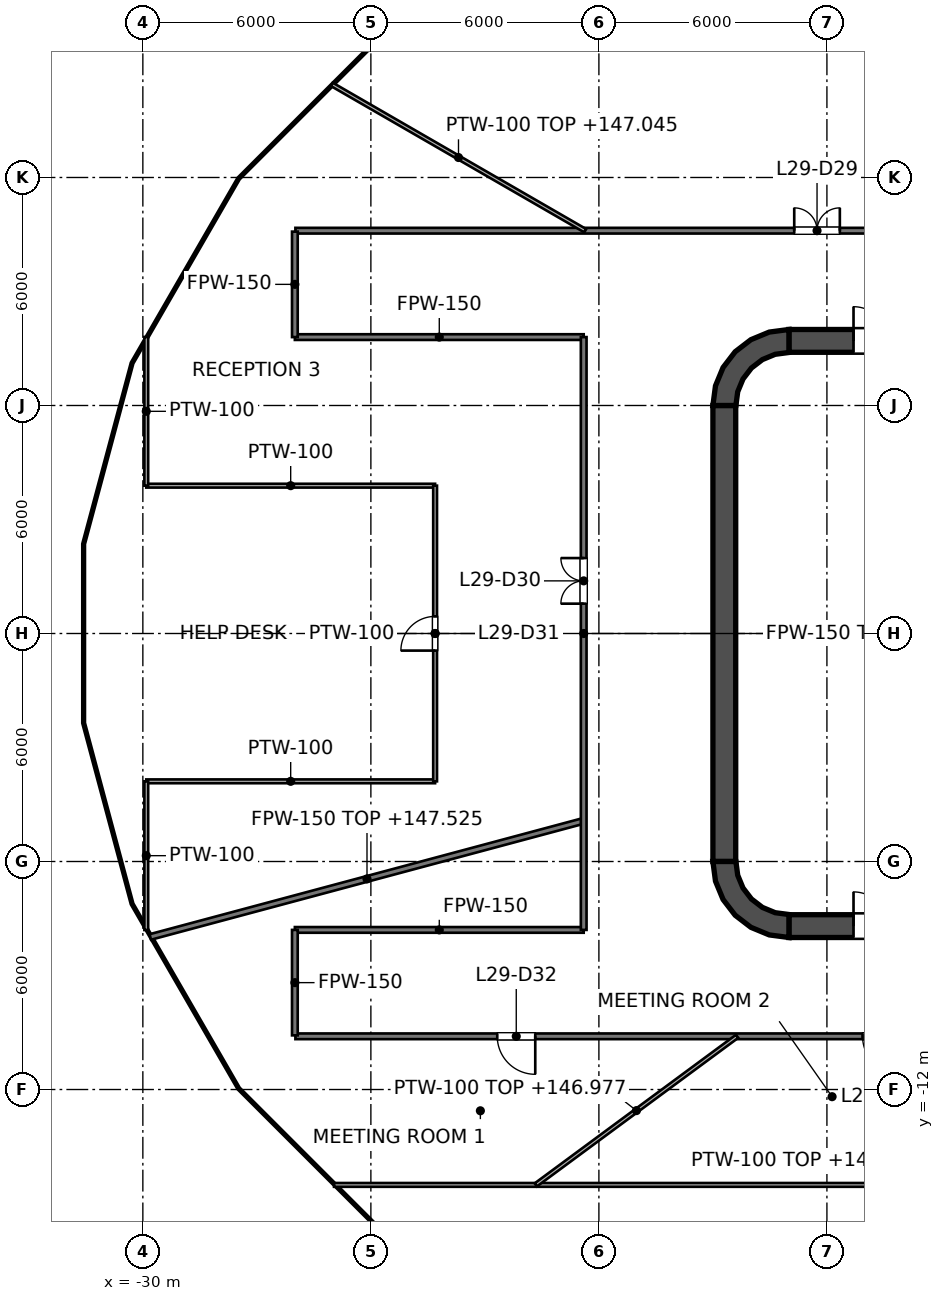
"""IFC4 building model, lengths in metres.
Left out: names, types, materials, properties, quantities, classifications, styles, units other than length and angle.
Written with IfcOpenShell. Run it as: python <this file> out.ifc"""

import sys

from ifc_helpers import new_model, si_unit, direction, frame, frame_2d, origin, place, context, subcontext, project, spatial, polyline, rectangle, outline, extrude, element, fill, save


model = new_model("IFC4")
c1 = context("Model", 3, precision=1e-05, world=origin(), true_north=direction((0.0, 1.0)))
c2 = subcontext(c1, "Body", "Model", "MODEL_VIEW")
j1 = project(units=[si_unit("LENGTHUNIT", "METRE"), si_unit("PLANEANGLEUNIT", "RADIAN")], contexts=[c1])
p1 = place(None, origin())
s1 = spatial("IfcSite", under=j1, at=p1, CompositionType="ELEMENT")
p2 = place(p1, origin())
s2 = spatial("IfcBuilding", under=s1, at=p2, CompositionType="ELEMENT")
p3 = place(p2, frame((0.0, 0.0, 144.0)))
s3 = spatial("IfcBuildingStorey", under=s2, at=p3, CompositionType="ELEMENT", Elevation=144.0)
p4 = place(p3, frame((-13.0, 7.7, 0.0), z_axis=(0.0, 0.0, 1.0), x_axis=(1.0, 0.0, 0.0)))
e1 = element("IfcWall", 1, at=p4, inside=s3, PredefinedType="SHEAR", context=c2, shape_type="SweptSolid", body=[
    extrude(rectangle(XDim=26.0, YDim=0.6, at=frame_2d((13.0, 0.0))), origin(), (0.0, 0.0, 1.0), 4.2),
])
p5 = place(p4, frame((1.7, 0.0, 0.0)))
e2 = element("IfcOpeningElement", 2, at=p5, cuts=e1, PredefinedType="OPENING", context=c2, shape_type="SweptSolid", body=[
    extrude(rectangle(XDim=1.8, YDim=2.1, at=frame_2d((0.9, 1.05))), frame((0.0, 0.3, 0.0), z_axis=(0.0, -1.0, 0.0), x_axis=(1.0, 0.0, 0.0)), (0.0, 0.0, 1.0), 0.6),
])
p6 = place(p4, frame((22.5, 0.0, 0.0)))
e3 = element("IfcOpeningElement", 3, at=p6, cuts=e1, PredefinedType="OPENING", context=c2, shape_type="SweptSolid", body=[
    extrude(rectangle(XDim=1.8, YDim=2.1, at=frame_2d((0.9, 1.05))), frame((0.0, 0.3, 0.0), z_axis=(0.0, -1.0, 0.0), x_axis=(1.0, 0.0, 0.0)), (0.0, 0.0, 1.0), 0.6),
])
p7 = place(p3, frame((-13.0, -7.7, 0.0), z_axis=(0.0, 0.0, 1.0), x_axis=(1.0, 0.0, 0.0)))
e4 = element("IfcWall", 4, at=p7, inside=s3, PredefinedType="SHEAR", context=c2, shape_type="SweptSolid", body=[
    extrude(rectangle(XDim=26.0, YDim=0.6, at=frame_2d((13.0, 0.0))), origin(), (0.0, 0.0, 1.0), 4.2),
])
p8 = place(p7, frame((1.7, 0.0, 0.0)))
e5 = element("IfcOpeningElement", 5, at=p8, cuts=e4, PredefinedType="OPENING", context=c2, shape_type="SweptSolid", body=[
    extrude(rectangle(XDim=1.8, YDim=2.1, at=frame_2d((0.9, 1.05))), frame((0.0, 0.3, 0.0), z_axis=(0.0, -1.0, 0.0), x_axis=(1.0, 0.0, 0.0)), (0.0, 0.0, 1.0), 0.6),
])
p9 = place(p7, frame((22.5, 0.0, 0.0)))
e6 = element("IfcOpeningElement", 6, at=p9, cuts=e4, PredefinedType="OPENING", context=c2, shape_type="SweptSolid", body=[
    extrude(rectangle(XDim=1.8, YDim=2.1, at=frame_2d((0.9, 1.05))), frame((0.0, 0.3, 0.0), z_axis=(0.0, -1.0, 0.0), x_axis=(1.0, 0.0, 0.0)), (0.0, 0.0, 1.0), 0.6),
])
p10 = place(p3, frame((-14.7, -6.0, 0.0), z_axis=(0.0, 0.0, 1.0), x_axis=(0.0, 1.0, 0.0)))
e7 = element("IfcWall", 7, at=p10, inside=s3, PredefinedType="SHEAR", context=c2, shape_type="SweptSolid", body=[
    extrude(rectangle(XDim=12.0, YDim=0.6, at=frame_2d((6.0, 0.0))), origin(), (0.0, 0.0, 1.0), 4.2),
])
p11 = place(p3, origin())
e8 = element("IfcWall", 8, at=p11, inside=s3, PredefinedType="SHEAR", context=c2, shape_type="SweptSolid", body=[
    extrude(outline(polyline([(-15.0, 6.0), (-14.395, 6.0), (-14.347, 6.361), (-14.208, 6.698), (-13.986, 6.986), (-13.698, 7.208), (-13.361, 7.347), (-13.0, 7.395), (-13.0, 8.0), (-13.518, 7.932), (-14.0, 7.732), (-14.414, 7.414), (-14.732, 7.0), (-14.932, 6.518), (-15.0, 6.0)])), origin(), (0.0, 0.0, 1.0), 4.2),
])
e9 = element("IfcWall", 9, at=p11, inside=s3, PredefinedType="SHEAR", context=c2, shape_type="SweptSolid", body=[
    extrude(outline(polyline([(-13.0, -8.0), (-13.0, -7.395), (-13.361, -7.347), (-13.698, -7.208), (-13.986, -6.986), (-14.208, -6.698), (-14.347, -6.361), (-14.395, -6.0), (-15.0, -6.0), (-14.932, -6.518), (-14.732, -7.0), (-14.414, -7.414), (-14.0, -7.732), (-13.518, -7.932), (-13.0, -8.0)])), origin(), (0.0, 0.0, 1.0), 4.2),
])
p12 = place(p3, frame((-11.8, -7.4, 0.0), z_axis=(0.0, 0.0, 1.0), x_axis=(0.0, 1.0, 0.0)))
e10 = element("IfcWall", 10, at=p12, inside=s3, PredefinedType="SOLIDWALL", context=c2, shape_type="SweptSolid", body=[
    extrude(rectangle(XDim=14.8, YDim=0.4, at=frame_2d((7.4, 0.0))), origin(), (0.0, 0.0, 1.0), 3.9),
])
p13 = place(p12, frame((11.2, 0.0, 0.0)))
e11 = element("IfcOpeningElement", 11, at=p13, cuts=e10, PredefinedType="OPENING", context=c2, shape_type="SweptSolid", body=[
    extrude(rectangle(XDim=1.1, YDim=2.1, at=frame_2d((0.55, 1.05))), frame((0.0, 0.2, 0.0), z_axis=(0.0, -1.0, 0.0), x_axis=(1.0, 0.0, 0.0)), (0.0, 0.0, 1.0), 0.4),
])
p14 = place(p12, frame((8.3, 0.0, 0.0)))
e12 = element("IfcOpeningElement", 12, at=p14, cuts=e10, PredefinedType="OPENING", context=c2, shape_type="SweptSolid", body=[
    extrude(rectangle(XDim=1.1, YDim=2.1, at=frame_2d((0.55, 1.05))), frame((0.0, 0.2, 0.0), z_axis=(0.0, -1.0, 0.0), x_axis=(1.0, 0.0, 0.0)), (0.0, 0.0, 1.0), 0.4),
])
p15 = place(p12, frame((5.4, 0.0, 0.0)))
e13 = element("IfcOpeningElement", 13, at=p15, cuts=e10, PredefinedType="OPENING", context=c2, shape_type="SweptSolid", body=[
    extrude(rectangle(XDim=1.1, YDim=2.1, at=frame_2d((0.55, 1.05))), frame((0.0, 0.2, 0.0), z_axis=(0.0, -1.0, 0.0), x_axis=(1.0, 0.0, 0.0)), (0.0, 0.0, 1.0), 0.4),
])
p16 = place(p12, frame((13.552, 0.0, 0.0)))
e14 = element("IfcOpeningElement", 14, at=p16, cuts=e10, PredefinedType="OPENING", context=c2, shape_type="SweptSolid", body=[
    extrude(rectangle(XDim=0.9, YDim=2.1, at=frame_2d((0.45, 1.05))), frame((0.0, 0.2, 0.0), z_axis=(0.0, -1.0, 0.0), x_axis=(1.0, 0.0, 0.0)), (0.0, 0.0, 1.0), 0.4),
])
p17 = place(p12, frame((0.347, 0.0, 0.0)))
e15 = element("IfcOpeningElement", 15, at=p17, cuts=e10, PredefinedType="OPENING", context=c2, shape_type="SweptSolid", body=[
    extrude(rectangle(XDim=0.9, YDim=2.1, at=frame_2d((0.45, 1.05))), frame((0.0, 0.2, 0.0), z_axis=(0.0, -1.0, 0.0), x_axis=(1.0, 0.0, 0.0)), (0.0, 0.0, 1.0), 0.4),
])
e16 = element("IfcWall", 16, at=p11, inside=s3, PredefinedType="SOLIDWALL", context=c2, shape_type="SweptSolid", body=[
    extrude(outline(polyline([(-12.0, -5.925), (-12.0, -5.675), (-14.15, -5.675), (-14.15, -3.025), (-12.0, -3.025), (-12.0, -2.775), (-14.15, -2.775), (-14.15, -0.125), (-12.0, -0.125), (-12.0, 0.125), (-14.15, 0.125), (-14.15, 2.775), (-12.0, 2.775), (-12.0, 3.025), (-14.15, 3.025), (-14.15, 5.675), (-12.0, 5.675), (-12.0, 5.925), (-14.15, 5.925), (-14.4, 5.925), (-14.4, 5.675), (-14.4, 3.025), (-14.4, 2.775), (-14.4, 0.125), (-14.4, -0.125), (-14.4, -2.775), (-14.4, -3.025), (-14.4, -5.675), (-14.4, -5.925), (-14.15, -5.925), (-12.0, -5.925)])), origin(), (0.0, 0.0, 1.0), 3.9),
])
p18 = place(p3, frame((-12.581, 21.79, 0.0), z_axis=(0.0, 0.0, 1.0), x_axis=(0.500038653944, -0.866003085769, 0.0)))
e17 = element("IfcWall", 17, at=p18, inside=s3, PredefinedType="PARTITIONING", context=c2, shape_type="SweptSolid", body=[
    extrude(rectangle(XDim=12.921, YDim=0.15, at=frame_2d((6.461, 0.0))), origin(), (0.0, 0.0, 1.0), 3.277),
])
p19 = place(p3, frame((-25.986, -10.6, 0.0), z_axis=(0.0, 0.0, 1.0), x_axis=(1.0, 0.0, 0.0)))
e18 = element("IfcWall", 18, at=p19, inside=s3, PredefinedType="PARTITIONING", context=c2, shape_type="SweptSolid", body=[
    extrude(rectangle(XDim=51.972, YDim=0.15, at=frame_2d((25.986, 0.0))), origin(), (0.0, 0.0, 1.0), 2.968),
])
p20 = place(p19, frame((47.628, 0.0, 0.0)))
e19 = element("IfcOpeningElement", 19, at=p20, cuts=e18, PredefinedType="OPENING", context=c2, shape_type="SweptSolid", body=[
    extrude(rectangle(XDim=1.0, YDim=2.1, at=frame_2d((0.5, 1.05))), frame((0.0, 0.075, 0.0), z_axis=(0.0, -1.0, 0.0), x_axis=(1.0, 0.0, 0.0)), (0.0, 0.0, 1.0), 0.15),
])
p21 = place(p19, frame((5.312, 0.0, 0.0)))
e20 = element("IfcOpeningElement", 20, at=p21, cuts=e18, PredefinedType="OPENING", context=c2, shape_type="SweptSolid", body=[
    extrude(rectangle(XDim=1.0, YDim=2.1, at=frame_2d((0.5, 1.05))), frame((0.0, 0.075, 0.0), z_axis=(0.0, -1.0, 0.0), x_axis=(1.0, 0.0, 0.0)), (0.0, 0.0, 1.0), 0.15),
])
p22 = place(p19, frame((14.924, 0.0, 0.0)))
e21 = element("IfcOpeningElement", 21, at=p22, cuts=e18, PredefinedType="OPENING", context=c2, shape_type="SweptSolid", body=[
    extrude(rectangle(XDim=1.0, YDim=2.1, at=frame_2d((0.5, 1.05))), frame((0.0, 0.075, 0.0), z_axis=(0.0, -1.0, 0.0), x_axis=(1.0, 0.0, 0.0)), (0.0, 0.0, 1.0), 0.15),
])
p23 = place(p19, frame((22.156, 0.0, 0.0)))
e22 = element("IfcOpeningElement", 22, at=p23, cuts=e18, PredefinedType="OPENING", context=c2, shape_type="SweptSolid", body=[
    extrude(rectangle(XDim=1.0, YDim=2.1, at=frame_2d((0.5, 1.05))), frame((0.0, 0.075, 0.0), z_axis=(0.0, -1.0, 0.0), x_axis=(1.0, 0.0, 0.0)), (0.0, 0.0, 1.0), 0.15),
])
p24 = place(p19, frame((27.795, 0.0, 0.0)))
e23 = element("IfcOpeningElement", 23, at=p24, cuts=e18, PredefinedType="OPENING", context=c2, shape_type="SweptSolid", body=[
    extrude(rectangle(XDim=1.0, YDim=2.1, at=frame_2d((0.5, 1.05))), frame((0.0, 0.075, 0.0), z_axis=(0.0, -1.0, 0.0), x_axis=(1.0, 0.0, 0.0)), (0.0, 0.0, 1.0), 0.15),
])
p25 = place(p19, frame((37.045, 0.0, 0.0)))
e24 = element("IfcOpeningElement", 24, at=p25, cuts=e18, PredefinedType="OPENING", context=c2, shape_type="SweptSolid", body=[
    extrude(rectangle(XDim=1.0, YDim=2.1, at=frame_2d((0.5, 1.05))), frame((0.0, 0.075, 0.0), z_axis=(0.0, -1.0, 0.0), x_axis=(1.0, 0.0, 0.0)), (0.0, 0.0, 1.0), 0.15),
])
for number, where, z_axis, x_axis in (
    (25, (-26.0, -7.8, 0.0), (0.0, 0.0, 1.0), (1.0, 0.0, 0.0)),
    (26, (-26.0, 7.8, 0.0), (0.0, 0.0, 1.0), (1.0, 0.0, 0.0)),
):
    element("IfcWall", number, at=place(p3, frame(where, z_axis=z_axis, x_axis=x_axis)), inside=s3, PredefinedType="PARTITIONING", context=c2, shape_type="SweptSolid", body=[
        extrude(rectangle(XDim=7.6, YDim=0.15, at=frame_2d((3.8, 0.0))), origin(), (0.0, 0.0, 1.0), 2.977),
    ])
p26 = place(p3, frame((-25.986, 10.6, 0.0), z_axis=(0.0, 0.0, 1.0), x_axis=(1.0, 0.0, 0.0)))
e27 = element("IfcWall", 27, at=p26, inside=s3, PredefinedType="PARTITIONING", context=c2, shape_type="SweptSolid", body=[
    extrude(rectangle(XDim=51.972, YDim=0.15, at=frame_2d((25.986, 0.0))), origin(), (0.0, 0.0, 1.0), 2.968),
])
p27 = place(p26, frame((42.031, 0.0, 0.0)))
e28 = element("IfcOpeningElement", 28, at=p27, cuts=e27, PredefinedType="OPENING", context=c2, shape_type="SweptSolid", body=[
    extrude(rectangle(XDim=1.0, YDim=2.1, at=frame_2d((0.5, 1.05))), frame((0.0, 0.075, 0.0), z_axis=(0.0, -1.0, 0.0), x_axis=(1.0, 0.0, 0.0)), (0.0, 0.0, 1.0), 0.15),
])
p28 = place(p26, frame((37.69, 0.0, 0.0)))
e29 = element("IfcOpeningElement", 29, at=p28, cuts=e27, PredefinedType="OPENING", context=c2, shape_type="SweptSolid", body=[
    extrude(rectangle(XDim=1.0, YDim=2.1, at=frame_2d((0.5, 1.05))), frame((0.0, 0.075, 0.0), z_axis=(0.0, -1.0, 0.0), x_axis=(1.0, 0.0, 0.0)), (0.0, 0.0, 1.0), 0.15),
])
p29 = place(p26, frame((32.156, 0.0, 0.0)))
e30 = element("IfcOpeningElement", 30, at=p29, cuts=e27, PredefinedType="OPENING", context=c2, shape_type="SweptSolid", body=[
    extrude(rectangle(XDim=1.0, YDim=2.1, at=frame_2d((0.5, 1.05))), frame((0.0, 0.075, 0.0), z_axis=(0.0, -1.0, 0.0), x_axis=(1.0, 0.0, 0.0)), (0.0, 0.0, 1.0), 0.15),
])
p30 = place(p26, frame((23.896, 0.0, 0.0)))
e31 = element("IfcOpeningElement", 31, at=p30, cuts=e27, PredefinedType="OPENING", context=c2, shape_type="SweptSolid", body=[
    extrude(rectangle(XDim=1.0, YDim=2.1, at=frame_2d((0.5, 1.05))), frame((0.0, 0.075, 0.0), z_axis=(0.0, -1.0, 0.0), x_axis=(1.0, 0.0, 0.0)), (0.0, 0.0, 1.0), 0.15),
])
p31 = place(p26, frame((13.126, 0.0, 0.0)))
e32 = element("IfcOpeningElement", 32, at=p31, cuts=e27, PredefinedType="OPENING", context=c2, shape_type="SweptSolid", body=[
    extrude(rectangle(XDim=1.2, YDim=2.1, at=frame_2d((0.6, 1.05))), frame((0.0, 0.075, 0.0), z_axis=(0.0, -1.0, 0.0), x_axis=(1.0, 0.0, 0.0)), (0.0, 0.0, 1.0), 0.15),
])
p32 = place(p3, frame((-29.804, -7.986, 0.0), z_axis=(0.0, 0.0, 1.0), x_axis=(0.965916389644, 0.258854260572, 0.0)))
e33 = element("IfcWall", 33, at=p32, inside=s3, PredefinedType="PARTITIONING", context=c2, shape_type="SweptSolid", body=[
    extrude(rectangle(XDim=11.806, YDim=0.15, at=frame_2d((5.903, 0.0))), origin(), (0.0, 0.0, 1.0), 3.525),
])
p33 = place(p3, frame((-18.4, -7.8, 0.0), z_axis=(0.0, 0.0, 1.0), x_axis=(0.0, 1.0, 0.0)))
e34 = element("IfcWall", 34, at=p33, inside=s3, PredefinedType="PARTITIONING", context=c2, shape_type="SweptSolid", body=[
    extrude(rectangle(XDim=15.6, YDim=0.15, at=frame_2d((7.8, 0.0))), origin(), (0.0, 0.0, 1.0), 2.968),
])
p34 = place(p33, frame((8.585, 0.0, 0.0)))
e35 = element("IfcOpeningElement", 35, at=p34, cuts=e34, PredefinedType="OPENING", context=c2, shape_type="SweptSolid", body=[
    extrude(rectangle(XDim=1.2, YDim=2.1, at=frame_2d((0.6, 1.05))), frame((0.0, 0.075, 0.0), z_axis=(0.0, -1.0, 0.0), x_axis=(1.0, 0.0, 0.0)), (0.0, 0.0, 1.0), 0.15),
])
for number, where, z_axis, x_axis in (
    (36, (-26.0, -10.575, 0.0), (0.0, 0.0, 1.0), (0.0, 1.0, 0.0)),
    (37, (-26.0, 7.8, 0.0), (0.0, 0.0, 1.0), (0.0, 1.0, 0.0)),
):
    element("IfcWall", number, at=place(p3, frame(where, z_axis=z_axis, x_axis=x_axis)), inside=s3, PredefinedType="PARTITIONING", context=c2, shape_type="SweptSolid", body=[
        extrude(rectangle(XDim=2.775, YDim=0.15, at=frame_2d((1.387, 0.0))), origin(), (0.0, 0.0, 1.0), 2.977),
    ])
p35 = place(p3, frame((-25.029, 14.451, 0.0), z_axis=(0.0, 0.0, 1.0), x_axis=(0.865996573404, -0.500049932359, 0.0)))
e38 = element("IfcWall", 38, at=p35, inside=s3, PredefinedType="PARTITIONING", context=c2, shape_type="SweptSolid", body=[
    extrude(rectangle(XDim=7.701, YDim=0.1, at=frame_2d((3.851, 0.0))), origin(), (0.0, 0.0, 1.0), 3.045),
])
p36 = place(p3, frame((-24.97, -14.51, 0.0), z_axis=(0.0, 0.0, 1.0), x_axis=(1.0, 0.0, 0.0)))
e39 = element("IfcWall", 39, at=p36, inside=s3, PredefinedType="PARTITIONING", context=c2, shape_type="SweptSolid", body=[
    extrude(rectangle(XDim=49.94, YDim=0.1, at=frame_2d((24.97, 0.0))), origin(), (0.0, 0.0, 1.0), 2.968),
])
p37 = place(p36, frame((19.461, 0.0, 0.0)))
e40 = element("IfcOpeningElement", 40, at=p37, cuts=e39, PredefinedType="OPENING", context=c2, shape_type="SweptSolid", body=[
    extrude(rectangle(XDim=1.8, YDim=2.1, at=frame_2d((0.9, 1.05))), frame((0.0, 0.05, 0.0), z_axis=(0.0, -1.0, 0.0), x_axis=(1.0, 0.0, 0.0)), (0.0, 0.0, 1.0), 0.1),
])
p38 = place(p36, frame((39.835, 0.0, 0.0)))
e41 = element("IfcOpeningElement", 41, at=p38, cuts=e39, PredefinedType="OPENING", context=c2, shape_type="SweptSolid", body=[
    extrude(rectangle(XDim=1.8, YDim=2.1, at=frame_2d((0.9, 1.05))), frame((0.0, 0.05, 0.0), z_axis=(0.0, -1.0, 0.0), x_axis=(1.0, 0.0, 0.0)), (0.0, 0.0, 1.0), 0.1),
])
for number, where, z_axis, x_axis in (
    (42, (-29.91, -3.89, 0.0), (0.0, 0.0, 1.0), (1.0, 0.0, 0.0)),
    (43, (-29.91, 3.89, 0.0), (0.0, 0.0, 1.0), (1.0, 0.0, 0.0)),
):
    element("IfcWall", number, at=place(p3, frame(where, z_axis=z_axis, x_axis=x_axis)), inside=s3, PredefinedType="PARTITIONING", context=c2, shape_type="SweptSolid", body=[
        extrude(rectangle(XDim=7.6, YDim=0.1, at=frame_2d((3.8, 0.0))), origin(), (0.0, 0.0, 1.0), 2.968),
    ])
p39 = place(p3, frame((-19.661, -14.51, 0.0), z_axis=(0.0, 0.0, 1.0), x_axis=(0.804603605329, 0.593812292136, 0.0)))
e44 = element("IfcWall", 44, at=p39, inside=s3, PredefinedType="PARTITIONING", context=c2, shape_type="SweptSolid", body=[
    extrude(rectangle(XDim=6.584, YDim=0.1, at=frame_2d((3.292, 0.0))), origin(), (0.0, 0.0, 1.0), 2.977),
])
p40 = place(p3, frame((-22.31, -3.89, 0.0), z_axis=(0.0, 0.0, 1.0), x_axis=(0.0, 1.0, 0.0)))
e45 = element("IfcWall", 45, at=p40, inside=s3, PredefinedType="PARTITIONING", context=c2, shape_type="SweptSolid", body=[
    extrude(rectangle(XDim=7.78, YDim=0.1, at=frame_2d((3.89, 0.0))), origin(), (0.0, 0.0, 1.0), 2.968),
])
p41 = place(p40, frame((3.44, 0.0, 0.0)))
e46 = element("IfcOpeningElement", 46, at=p41, cuts=e45, PredefinedType="OPENING", context=c2, shape_type="SweptSolid", body=[
    extrude(rectangle(XDim=0.9, YDim=2.1, at=frame_2d((0.45, 1.05))), frame((0.0, 0.05, 0.0), z_axis=(0.0, -1.0, 0.0), x_axis=(1.0, 0.0, 0.0)), (0.0, 0.0, 1.0), 0.1),
])
for number, where, z_axis, x_axis in (
    (47, (-29.91, -7.803, 0.0), (0.0, 0.0, 1.0), (0.0, 1.0, 0.0)),
    (48, (-29.91, 3.89, 0.0), (0.0, 0.0, 1.0), (0.0, 1.0, 0.0)),
):
    element("IfcWall", number, at=place(p3, frame(where, z_axis=z_axis, x_axis=x_axis)), inside=s3, PredefinedType="PARTITIONING", context=c2, shape_type="SweptSolid", body=[
        extrude(rectangle(XDim=3.913, YDim=0.1, at=frame_2d((1.957, 0.0))), origin(), (0.0, 0.0, 1.0), 2.968),
    ])
p42 = place(p13, origin())
e49 = element("IfcDoor", 49, at=p42, inside=s3, OperationType="DOUBLE_DOOR_SLIDING", PredefinedType="DOOR", context=c2, shape_type="SweptSolid", body=[
    extrude(rectangle(XDim=1.1, YDim=2.1, at=frame_2d((0.55, 1.05))), frame((0.0, 0.025, 0.0), z_axis=(0.0, -1.0, 0.0), x_axis=(1.0, 0.0, 0.0)), (0.0, 0.0, 1.0), 0.05),
])
fill(e11, e49)
p43 = place(p14, origin())
e50 = element("IfcDoor", 50, at=p43, inside=s3, OperationType="DOUBLE_DOOR_SLIDING", PredefinedType="DOOR", context=c2, shape_type="SweptSolid", body=[
    extrude(rectangle(XDim=1.1, YDim=2.1, at=frame_2d((0.55, 1.05))), frame((0.0, 0.025, 0.0), z_axis=(0.0, -1.0, 0.0), x_axis=(1.0, 0.0, 0.0)), (0.0, 0.0, 1.0), 0.05),
])
fill(e12, e50)
p44 = place(p15, origin())
e51 = element("IfcDoor", 51, at=p44, inside=s3, OperationType="DOUBLE_DOOR_SLIDING", PredefinedType="DOOR", context=c2, shape_type="SweptSolid", body=[
    extrude(rectangle(XDim=1.1, YDim=2.1, at=frame_2d((0.55, 1.05))), frame((0.0, 0.025, 0.0), z_axis=(0.0, -1.0, 0.0), x_axis=(1.0, 0.0, 0.0)), (0.0, 0.0, 1.0), 0.05),
])
fill(e13, e51)
p45 = place(p16, origin())
e52 = element("IfcDoor", 52, at=p45, inside=s3, OperationType="SINGLE_SWING_LEFT", PredefinedType="DOOR", context=c2, shape_type="SweptSolid", body=[
    extrude(rectangle(XDim=0.9, YDim=2.1, at=frame_2d((0.45, 1.05))), frame((0.0, 0.025, 0.0), z_axis=(0.0, -1.0, 0.0), x_axis=(1.0, 0.0, 0.0)), (0.0, 0.0, 1.0), 0.05),
])
fill(e14, e52)
p46 = place(p17, origin())
e53 = element("IfcDoor", 53, at=p46, inside=s3, OperationType="SINGLE_SWING_LEFT", PredefinedType="DOOR", context=c2, shape_type="SweptSolid", body=[
    extrude(rectangle(XDim=0.9, YDim=2.1, at=frame_2d((0.45, 1.05))), frame((0.0, 0.025, 0.0), z_axis=(0.0, -1.0, 0.0), x_axis=(1.0, 0.0, 0.0)), (0.0, 0.0, 1.0), 0.05),
])
fill(e15, e53)
p47 = place(p5, origin())
e54 = element("IfcDoor", 54, at=p47, inside=s3, OperationType="DOUBLE_DOOR_SINGLE_SWING", PredefinedType="DOOR", context=c2, shape_type="SweptSolid", body=[
    extrude(rectangle(XDim=1.8, YDim=2.1, at=frame_2d((0.9, 1.05))), frame((0.0, 0.025, 0.0), z_axis=(0.0, -1.0, 0.0), x_axis=(1.0, 0.0, 0.0)), (0.0, 0.0, 1.0), 0.05),
])
fill(e2, e54)
p48 = place(p8, origin())
e55 = element("IfcDoor", 55, at=p48, inside=s3, OperationType="DOUBLE_DOOR_SINGLE_SWING", PredefinedType="DOOR", context=c2, shape_type="SweptSolid", body=[
    extrude(rectangle(XDim=1.8, YDim=2.1, at=frame_2d((0.9, 1.05))), frame((0.0, 0.025, 0.0), z_axis=(0.0, -1.0, 0.0), x_axis=(1.0, 0.0, 0.0)), (0.0, 0.0, 1.0), 0.05),
])
fill(e5, e55)
p49 = place(p31, origin())
e56 = element("IfcDoor", 56, at=p49, inside=s3, OperationType="DOUBLE_DOOR_SINGLE_SWING", PredefinedType="DOOR", context=c2, shape_type="SweptSolid", body=[
    extrude(rectangle(XDim=1.2, YDim=2.1, at=frame_2d((0.6, 1.05))), frame((0.0, 0.025, 0.0), z_axis=(0.0, -1.0, 0.0), x_axis=(1.0, 0.0, 0.0)), (0.0, 0.0, 1.0), 0.05),
])
fill(e32, e56)
p50 = place(p34, origin())
e57 = element("IfcDoor", 57, at=p50, inside=s3, OperationType="DOUBLE_DOOR_SINGLE_SWING", PredefinedType="DOOR", context=c2, shape_type="SweptSolid", body=[
    extrude(rectangle(XDim=1.2, YDim=2.1, at=frame_2d((0.6, 1.05))), frame((0.0, 0.025, 0.0), z_axis=(0.0, -1.0, 0.0), x_axis=(1.0, 0.0, 0.0)), (0.0, 0.0, 1.0), 0.05),
])
fill(e35, e57)
p51 = place(p41, origin())
e58 = element("IfcDoor", 58, at=p51, inside=s3, OperationType="SINGLE_SWING_LEFT", PredefinedType="DOOR", context=c2, shape_type="SweptSolid", body=[
    extrude(rectangle(XDim=0.9, YDim=2.1, at=frame_2d((0.45, 1.05))), frame((0.0, 0.025, 0.0), z_axis=(0.0, -1.0, 0.0), x_axis=(1.0, 0.0, 0.0)), (0.0, 0.0, 1.0), 0.05),
])
fill(e46, e58)
p52 = place(p21, origin())
e59 = element("IfcDoor", 59, at=p52, inside=s3, OperationType="SINGLE_SWING_RIGHT", PredefinedType="DOOR", context=c2, shape_type="SweptSolid", body=[
    extrude(rectangle(XDim=1.0, YDim=2.1, at=frame_2d((0.5, 1.05))), frame((0.0, 0.025, 0.0), z_axis=(0.0, -1.0, 0.0), x_axis=(1.0, 0.0, 0.0)), (0.0, 0.0, 1.0), 0.05),
])
fill(e20, e59)
p53 = place(p22, origin())
e60 = element("IfcDoor", 60, at=p53, inside=s3, OperationType="SINGLE_SWING_RIGHT", PredefinedType="DOOR", context=c2, shape_type="SweptSolid", body=[
    extrude(rectangle(XDim=1.0, YDim=2.1, at=frame_2d((0.5, 1.05))), frame((0.0, 0.025, 0.0), z_axis=(0.0, -1.0, 0.0), x_axis=(1.0, 0.0, 0.0)), (0.0, 0.0, 1.0), 0.05),
])
fill(e21, e60)
save(model, sys.argv[1])
